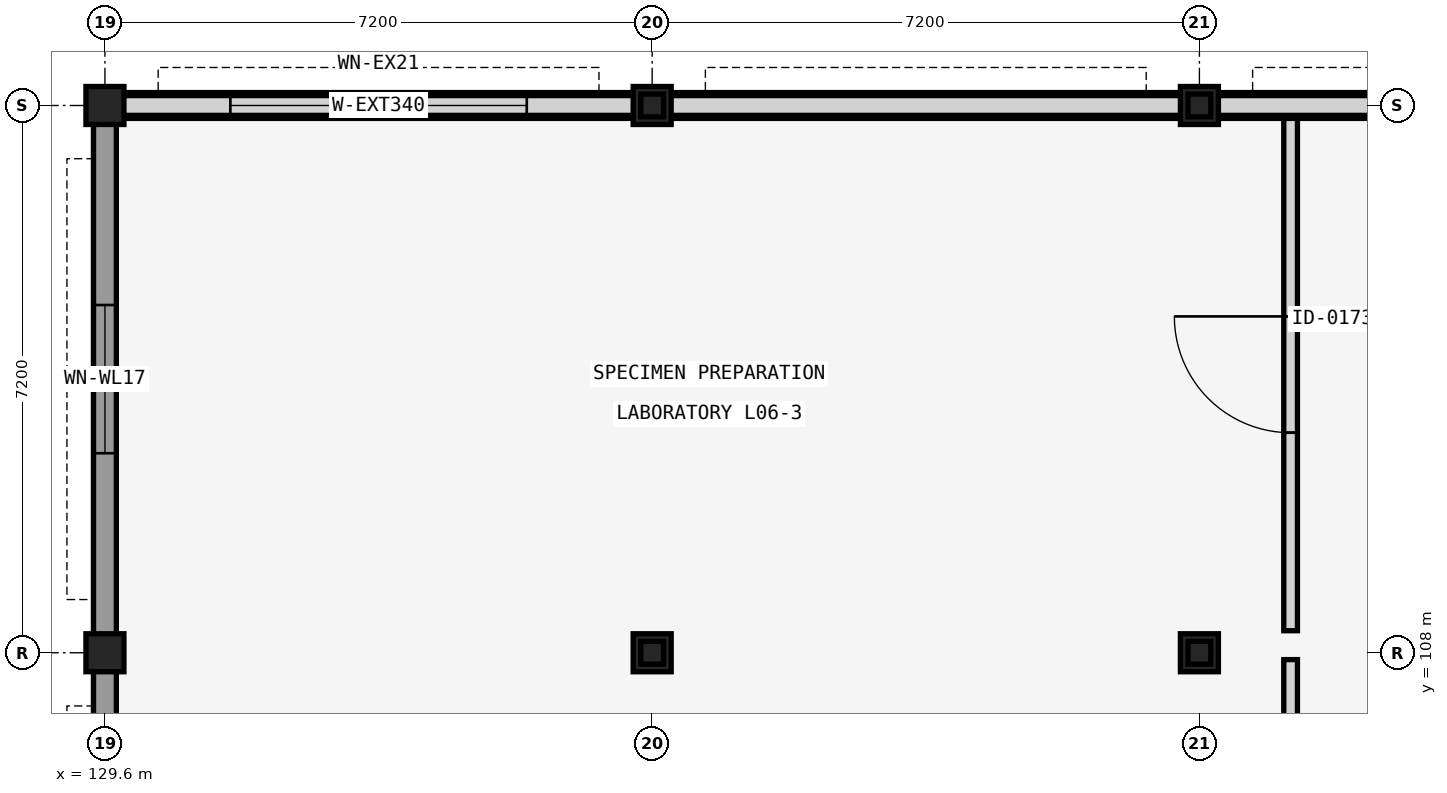
"""IFC4 building model, lengths in metres.
Left out: names, types, materials, properties, quantities, classifications, styles, units other than length and angle.
Written with IfcOpenShell. Run it as: python <this file> out.ifc"""

import sys

from ifc_helpers import new_model, si_unit, direction, frame, frame_2d, origin, origin_2d, place, context, subcontext, project, spatial, polyline, rectangle, i_section, outline, extrude, element, fill, save


model = new_model("IFC4")
c1 = context("Model", 3, precision=1e-05, world=origin(), true_north=direction((0.0, 1.0)))
c2 = subcontext(c1, "Body", "Model", "MODEL_VIEW")
j1 = project(units=[si_unit("LENGTHUNIT", "METRE"), si_unit("PLANEANGLEUNIT", "RADIAN")], contexts=[c1])
p1 = place(None, origin())
s1 = spatial("IfcSite", under=j1, at=p1, CompositionType="ELEMENT")
p2 = place(p1, origin())
s2 = spatial("IfcBuilding", under=s1, at=p2, CompositionType="ELEMENT")
p3 = place(p2, frame((0.0, 0.0, 25.6)))
s3 = spatial("IfcBuildingStorey", under=s2, at=p3, CompositionType="ELEMENT", Elevation=25.6)
for number, where, z_axis, x_axis in (
    (1, (129.6, 108.0, 0.0), (0.0, 0.0, 1.0), (1.0, 0.0, 0.0)),
    (2, (129.6, 115.2, 0.0), (0.0, 0.0, 1.0), (1.0, 0.0, 0.0)),
    (3, (136.8, 108.0, 0.0), (0.0, 0.0, 1.0), (1.0, 0.0, 0.0)),
    (4, (136.8, 115.2, 0.0), (0.0, 0.0, 1.0), (1.0, 0.0, 0.0)),
    (5, (144.0, 108.0, 0.0), (0.0, 0.0, 1.0), (1.0, 0.0, 0.0)),
    (6, (144.0, 115.2, 0.0), (0.0, 0.0, 1.0), (1.0, 0.0, 0.0)),
):
    element("IfcColumn", number, at=place(p3, frame(where, z_axis=z_axis, x_axis=x_axis)), inside=s3, PredefinedType="COLUMN", context=c2, shape_type="SweptSolid", body=[
        extrude(rectangle(XDim=0.5, YDim=0.5, at=origin_2d()), origin(), (0.0, 0.0, 1.0), 4.16),
    ])
p4 = place(p3, frame((136.8, 108.0, 4.16), z_axis=(0.0, 0.0, 1.0), x_axis=(1.0, 0.0, 0.0)))
e7 = element("IfcColumn", 7, at=p4, inside=s3, PredefinedType="COLUMN", context=c2, shape_type="SweptSolid", body=[
    extrude(i_section(OverallWidth=0.3, OverallDepth=0.3, WebThickness=0.011, FlangeThickness=0.019, FilletRadius=0.027, at=origin_2d()), origin(), (0.0, 0.0, 1.0), 2.06),
])
p5 = place(p3, frame((136.8, 115.2, 4.16), z_axis=(0.0, 0.0, 1.0), x_axis=(1.0, 0.0, 0.0)))
e8 = element("IfcColumn", 8, at=p5, inside=s3, PredefinedType="COLUMN", context=c2, shape_type="SweptSolid", body=[
    extrude(i_section(OverallWidth=0.3, OverallDepth=0.3, WebThickness=0.011, FlangeThickness=0.019, FilletRadius=0.027, at=origin_2d()), origin(), (0.0, 0.0, 1.0), 2.84),
])
p6 = place(p3, frame((144.0, 108.0, 4.16), z_axis=(0.0, 0.0, 1.0), x_axis=(1.0, 0.0, 0.0)))
e9 = element("IfcColumn", 9, at=p6, inside=s3, PredefinedType="COLUMN", context=c2, shape_type="SweptSolid", body=[
    extrude(i_section(OverallWidth=0.3, OverallDepth=0.3, WebThickness=0.011, FlangeThickness=0.019, FilletRadius=0.027, at=origin_2d()), origin(), (0.0, 0.0, 1.0), 2.06),
])
p7 = place(p3, frame((144.0, 115.2, 4.16), z_axis=(0.0, 0.0, 1.0), x_axis=(1.0, 0.0, 0.0)))
e10 = element("IfcColumn", 10, at=p7, inside=s3, PredefinedType="COLUMN", context=c2, shape_type="SweptSolid", body=[
    extrude(i_section(OverallWidth=0.3, OverallDepth=0.3, WebThickness=0.011, FlangeThickness=0.019, FilletRadius=0.027, at=origin_2d()), origin(), (0.0, 0.0, 1.0), 2.84),
])
p8 = place(p3, frame((129.84, 115.2, 0.0), z_axis=(0.0, 0.0, 1.0), x_axis=(1.0, 0.0, 0.0)))
e11 = element("IfcWall", 11, at=p8, inside=s3, PredefinedType="SOLIDWALL", context=c2, shape_type="SweptSolid", body=[
    extrude(rectangle(XDim=6.72, YDim=0.34, at=frame_2d((3.36, 0.0))), origin(), (0.0, 0.0, 1.0), 3.55),
])
p9 = place(p8, frame((1.41, 0.0, 0.68)))
e12 = element("IfcOpeningElement", 12, at=p9, cuts=e11, PredefinedType="OPENING", context=c2, shape_type="SweptSolid", body=[
    extrude(rectangle(XDim=3.9, YDim=2.05, at=frame_2d((1.95, 1.025))), frame((0.0, 0.18, 0.0), z_axis=(0.0, -1.0, 0.0), x_axis=(1.0, 0.0, 0.0)), (0.0, 0.0, 1.0), 0.36),
])
p10 = place(p3, frame((137.04, 115.2, 0.0), z_axis=(0.0, 0.0, 1.0), x_axis=(1.0, 0.0, 0.0)))
e13 = element("IfcWall", 13, at=p10, inside=s3, PredefinedType="SOLIDWALL", context=c2, shape_type="SweptSolid", body=[
    extrude(rectangle(XDim=6.72, YDim=0.34, at=frame_2d((3.36, 0.0))), origin(), (0.0, 0.0, 1.0), 3.55),
])
p11 = place(p3, frame((144.24, 115.2, 0.0), z_axis=(0.0, 0.0, 1.0), x_axis=(1.0, 0.0, 0.0)))
e14 = element("IfcWall", 14, at=p11, inside=s3, PredefinedType="SOLIDWALL", context=c2, shape_type="SweptSolid", body=[
    extrude(rectangle(XDim=6.72, YDim=0.34, at=frame_2d((3.36, 0.0))), origin(), (0.0, 0.0, 1.0), 3.55),
])
p12 = place(p11, frame((2.935, 0.0, 0.68)))
e15 = element("IfcOpeningElement", 15, at=p12, cuts=e14, PredefinedType="OPENING", context=c2, shape_type="SweptSolid", body=[
    extrude(rectangle(XDim=0.85, YDim=2.3, at=frame_2d((0.425, 1.15))), frame((0.0, 0.18, 0.0), z_axis=(0.0, -1.0, 0.0), x_axis=(1.0, 0.0, 0.0)), (0.0, 0.0, 1.0), 0.36),
])
p13 = place(p3, frame((129.6, 101.04, 0.0), z_axis=(0.0, 0.0, 1.0), x_axis=(0.0, 1.0, 0.0)))
e16 = element("IfcWall", 16, at=p13, inside=s3, PredefinedType="SOLIDWALL", context=c2, shape_type="SweptSolid", body=[
    extrude(rectangle(XDim=6.72, YDim=0.3, at=frame_2d((3.36, 0.0))), origin(), (0.0, 0.0, 1.0), 3.55),
])
p14 = place(p13, frame((2.61, 0.0, 0.68)))
e17 = element("IfcOpeningElement", 17, at=p14, cuts=e16, PredefinedType="OPENING", context=c2, shape_type="SweptSolid", body=[
    extrude(rectangle(XDim=1.5, YDim=1.8, at=frame_2d((0.75, 0.9))), frame((0.0, 0.16, 0.0), z_axis=(0.0, -1.0, 0.0), x_axis=(1.0, 0.0, 0.0)), (0.0, 0.0, 1.0), 0.32),
])
p15 = place(p3, frame((129.6, 108.24, 0.0), z_axis=(0.0, 0.0, 1.0), x_axis=(0.0, 1.0, 0.0)))
e18 = element("IfcWall", 18, at=p15, inside=s3, PredefinedType="SOLIDWALL", context=c2, shape_type="SweptSolid", body=[
    extrude(rectangle(XDim=6.72, YDim=0.3, at=frame_2d((3.36, 0.0))), origin(), (0.0, 0.0, 1.0), 3.55),
])
p16 = place(p15, frame((2.385, 0.0, 0.68)))
e19 = element("IfcOpeningElement", 19, at=p16, cuts=e18, PredefinedType="OPENING", context=c2, shape_type="SweptSolid", body=[
    extrude(rectangle(XDim=1.95, YDim=1.95, at=frame_2d((0.975, 0.975))), frame((0.0, 0.16, 0.0), z_axis=(0.0, -1.0, 0.0), x_axis=(1.0, 0.0, 0.0)), (0.0, 0.0, 1.0), 0.32),
])
for number, where, z_axis, x_axis in (
    (20, (129.6, 115.2, 4.16), (0.0, 0.0, 1.0), (1.0, 0.0, 0.0)),
    (21, (144.0, 115.2, 4.16), (0.0, 0.0, 1.0), (1.0, 0.0, 0.0)),
):
    element("IfcWall", number, at=place(p3, frame(where, z_axis=z_axis, x_axis=x_axis)), inside=s3, PredefinedType="SOLIDWALL", context=c2, shape_type="SweptSolid", body=[
        extrude(rectangle(XDim=14.4, YDim=0.26, at=frame_2d((7.2, 0.0))), origin(), (0.0, 0.0, 1.0), 2.42),
    ])
p17 = place(p3, frame((129.6, 86.4, 4.16), z_axis=(0.0, 0.0, 1.0), x_axis=(0.0, 1.0, 0.0)))
e22 = element("IfcWall", 22, at=p17, inside=s3, PredefinedType="SHEAR", context=c2, shape_type="SweptSolid", body=[
    extrude(outline(polyline([(0.0, 0.0), (28.8, 0.0), (28.8, 0.12), (28.76, 3.12), (0.0, 0.12), (0.0, 0.0)])), frame((0.0, 0.15, 0.0), z_axis=(0.0, -1.0, 0.0), x_axis=(1.0, 0.0, 0.0)), (0.0, 0.0, 1.0), 0.3),
])
p18 = place(p3, frame((145.2, 79.49, 0.0), z_axis=(0.0, 0.0, 1.0), x_axis=(0.0, 1.0, 0.0)))
e23 = element("IfcWall", 23, at=p18, inside=s3, PredefinedType="PARTITIONING", context=c2, shape_type="SweptSolid", body=[
    extrude(rectangle(XDim=28.42, YDim=0.18, at=frame_2d((14.21, 0.0))), origin(), (0.0, 0.0, 1.0), 3.81),
])
p19 = place(p18, frame((9.207, 0.0, 0.0)))
e24 = element("IfcOpeningElement", 24, at=p19, cuts=e23, PredefinedType="OPENING", context=c2, shape_type="SweptSolid", body=[
    extrude(rectangle(XDim=1.48, YDim=2.18, at=frame_2d((0.74, 1.09))), frame((0.0, 0.1, 0.0), z_axis=(0.0, -1.0, 0.0), x_axis=(1.0, 0.0, 0.0)), (0.0, 0.0, 1.0), 0.2),
])
p20 = place(p3, frame((145.2, 108.29, 0.0), z_axis=(0.0, 0.0, 1.0), x_axis=(0.0, 1.0, 0.0)))
e25 = element("IfcWall", 25, at=p20, inside=s3, PredefinedType="PARTITIONING", context=c2, shape_type="SweptSolid", body=[
    extrude(rectangle(XDim=6.74, YDim=0.18, at=frame_2d((3.37, 0.0))), origin(), (0.0, 0.0, 1.0), 3.81),
])
p21 = place(p20, frame((2.605, 0.0, 0.0)))
e26 = element("IfcOpeningElement", 26, at=p21, cuts=e25, PredefinedType="OPENING", context=c2, shape_type="SweptSolid", body=[
    extrude(rectangle(XDim=1.53, YDim=2.18, at=frame_2d((0.765, 1.09))), frame((0.0, 0.1, 0.0), z_axis=(0.0, -1.0, 0.0), x_axis=(1.0, 0.0, 0.0)), (0.0, 0.0, 1.0), 0.2),
])
p22 = place(p9, origin())
e27 = element("IfcWindow", 27, at=p22, inside=s3, PartitioningType="SINGLE_PANEL", PredefinedType="WINDOW", context=c2, shape_type="SweptSolid", body=[
    extrude(rectangle(XDim=3.9, YDim=2.05, at=frame_2d((1.95, 1.025))), frame((0.0, 0.03, 0.0), z_axis=(0.0, -1.0, 0.0), x_axis=(1.0, 0.0, 0.0)), (0.0, 0.0, 1.0), 0.06),
])
fill(e12, e27)
p23 = place(p16, origin())
e28 = element("IfcWindow", 28, at=p23, inside=s3, PartitioningType="SINGLE_PANEL", PredefinedType="WINDOW", context=c2, shape_type="SweptSolid", body=[
    extrude(rectangle(XDim=1.95, YDim=1.95, at=frame_2d((0.975, 0.975))), frame((0.0, 0.03, 0.0), z_axis=(0.0, -1.0, 0.0), x_axis=(1.0, 0.0, 0.0)), (0.0, 0.0, 1.0), 0.06),
])
fill(e19, e28)
p24 = place(p21, origin())
e29 = element("IfcDoor", 29, at=p24, inside=s3, OperationType="SINGLE_SWING_RIGHT", PredefinedType="DOOR", context=c2, shape_type="SweptSolid", body=[
    extrude(rectangle(XDim=1.53, YDim=2.18, at=frame_2d((0.765, 1.09))), frame((0.0, 0.025, 0.0), z_axis=(0.0, -1.0, 0.0), x_axis=(1.0, 0.0, 0.0)), (0.0, 0.0, 1.0), 0.05),
])
fill(e26, e29)
save(model, sys.argv[1])
